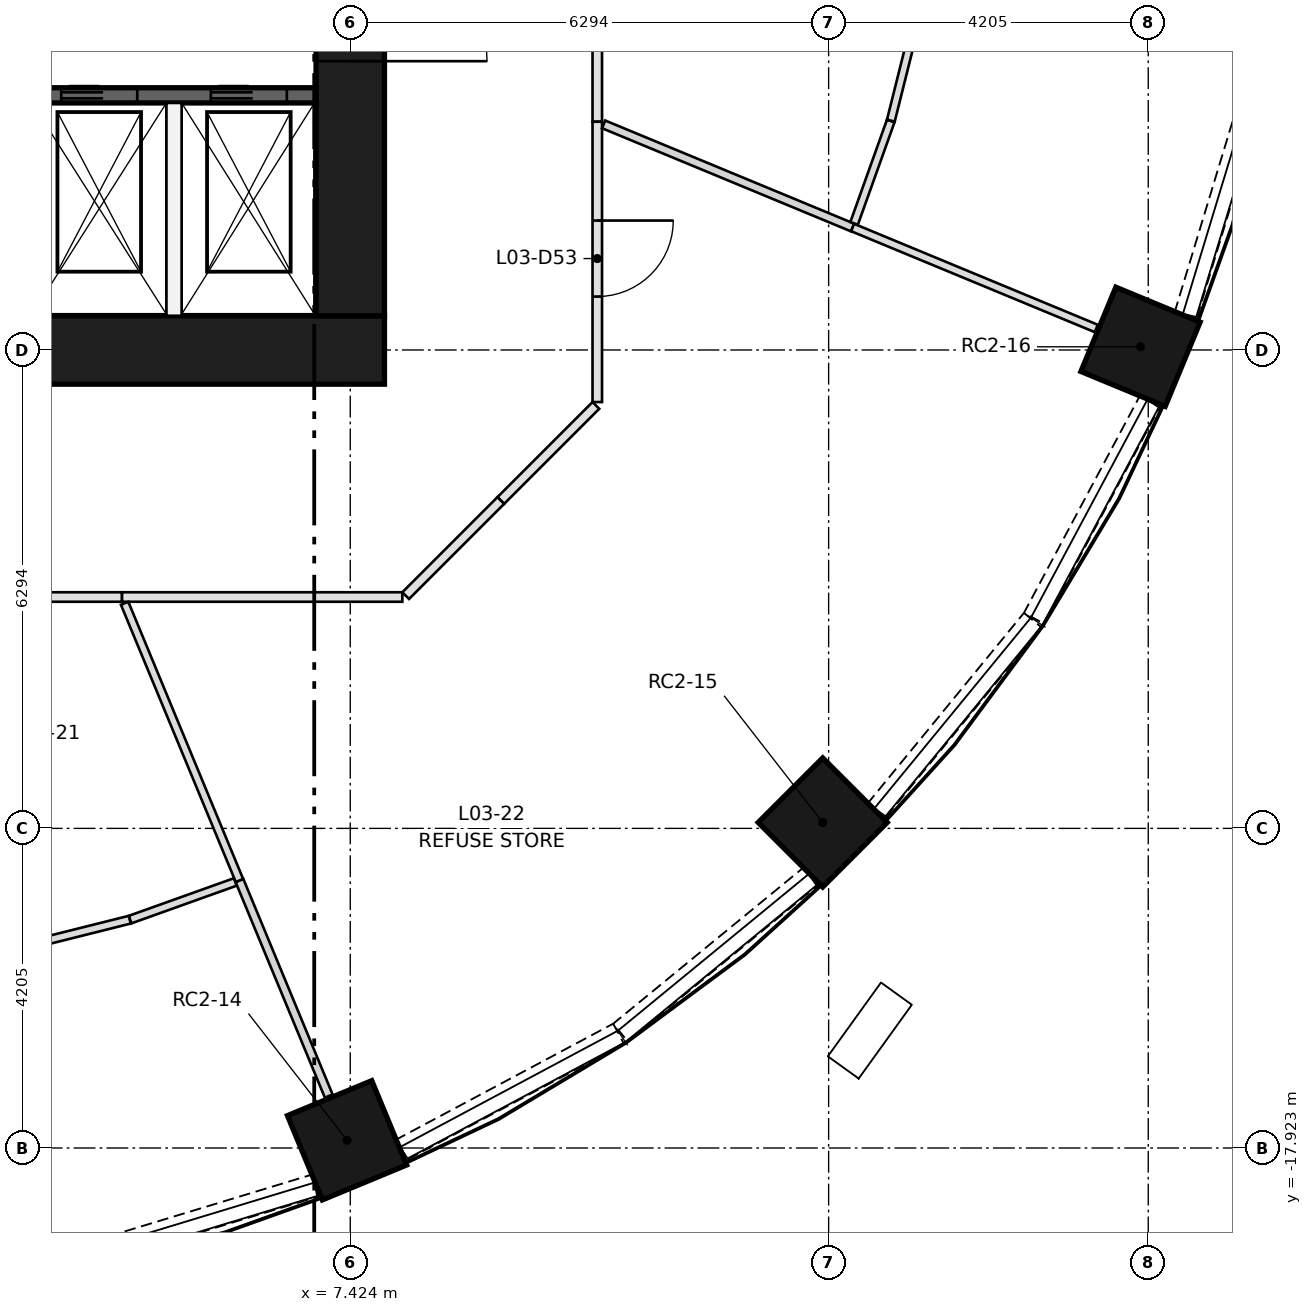
"""IFC4 building model, lengths in metres.
Left out: names, types, materials, properties, quantities, classifications, styles, units other than length and angle.
Written with IfcOpenShell. Run it as: python <this file> out.ifc"""

import sys

from ifc_helpers import new_model, si_unit, direction, frame, frame_2d, origin, origin_2d, place, context, subcontext, project, spatial, rectangle, extrude, element, fill, save


model = new_model("IFC4")
c1 = context("Model", 3, precision=1e-05, world=origin(), true_north=direction((0.0, 1.0)))
c2 = subcontext(c1, "Body", "Model", "MODEL_VIEW")
j1 = project(units=[si_unit("LENGTHUNIT", "METRE"), si_unit("PLANEANGLEUNIT", "RADIAN")], contexts=[c1])
p1 = place(None, origin())
s1 = spatial("IfcSite", under=j1, at=p1, CompositionType="ELEMENT")
p2 = place(p1, origin())
s2 = spatial("IfcBuilding", under=s1, at=p2, CompositionType="ELEMENT")
p3 = place(p2, frame((0.0, 0.0, 14.4)))
s3 = spatial("IfcBuildingStorey", under=s2, at=p3, CompositionType="ELEMENT", Elevation=14.4)
for number, where, z_axis, x_axis in (
    (1, (7.382, -17.822, 0.0), (0.0, 0.0, 1.0), (0.383, -0.924, 0.0)),
    (2, (13.64, -13.64, 0.0), (0.0, 0.0, 1.0), (0.707, -0.707, 0.0)),
    (3, (17.822, -7.382, 0.0), (0.0, 0.0, 1.0), (0.924, -0.383, 0.0)),
):
    element("IfcColumn", number, at=place(p3, frame(where, z_axis=z_axis, x_axis=x_axis)), inside=s3, PredefinedType="COLUMN", context=c2, shape_type="SweptSolid", body=[
        extrude(rectangle(XDim=1.2, YDim=1.2, at=origin_2d()), origin(), (0.0, 0.0, 1.0), 4.1),
    ])
p4 = place(p3, frame((-7.874, -7.424, 0.0), z_axis=(0.0, 0.0, 1.0), x_axis=(1.0, 0.0, 0.0)))
e4 = element("IfcWall", 4, at=p4, inside=s3, PredefinedType="SHEAR", context=c2, shape_type="SweptSolid", body=[
    extrude(rectangle(XDim=15.748, YDim=0.9, at=frame_2d((7.874, 0.0))), origin(), (0.0, 0.0, 1.0), 4.1),
])
p5 = place(p3, frame((7.424, -6.974, 0.0), z_axis=(0.0, 0.0, 1.0), x_axis=(0.0, 1.0, 0.0)))
e5 = element("IfcWall", 5, at=p5, inside=s3, PredefinedType="SHEAR", context=c2, shape_type="SweptSolid", body=[
    extrude(rectangle(XDim=13.948, YDim=0.9, at=frame_2d((6.974, 0.0))), origin(), (0.0, 0.0, 1.0), 4.1),
])
p6 = place(p5, frame((6.474, 0.0, 0.0)))
e6 = element("IfcOpeningElement", 6, at=p6, cuts=e5, PredefinedType="OPENING", context=c2, shape_type="SweptSolid", body=[
    extrude(rectangle(XDim=1.0, YDim=2.1, at=frame_2d((0.5, 1.05))), frame((0.0, 0.46, 0.0), z_axis=(0.0, -1.0, 0.0), x_axis=(1.0, 0.0, 0.0)), (0.0, 0.0, 1.0), 0.92),
])
p7 = place(p5, frame((3.35, 0.0, 0.0)))
e7 = element("IfcOpeningElement", 7, at=p7, cuts=e5, PredefinedType="OPENING", context=c2, shape_type="SweptSolid", body=[
    extrude(rectangle(XDim=1.8, YDim=2.1, at=frame_2d((0.9, 1.05))), frame((0.0, 0.46, 0.0), z_axis=(0.0, -1.0, 0.0), x_axis=(1.0, 0.0, 0.0)), (0.0, 0.0, 1.0), 0.92),
])
p8 = place(p5, frame((8.799, 0.0, 0.0)))
e8 = element("IfcOpeningElement", 8, at=p8, cuts=e5, PredefinedType="OPENING", context=c2, shape_type="SweptSolid", body=[
    extrude(rectangle(XDim=1.8, YDim=2.1, at=frame_2d((0.9, 1.05))), frame((0.0, 0.46, 0.0), z_axis=(0.0, -1.0, 0.0), x_axis=(1.0, 0.0, 0.0)), (0.0, 0.0, 1.0), 0.92),
])
p9 = place(p3, frame((-6.974, -4.074, 0.0), z_axis=(0.0, 0.0, 1.0), x_axis=(1.0, 0.0, 0.0)))
e9 = element("IfcWall", 9, at=p9, inside=s3, PredefinedType="SHEAR", context=c2, shape_type="SweptSolid", body=[
    extrude(rectangle(XDim=13.948, YDim=0.2, at=frame_2d((6.974, 0.0))), origin(), (0.0, 0.0, 1.0), 3.7),
])
p10 = place(p9, frame((0.918, 0.0, 0.0)))
e10 = element("IfcOpeningElement", 10, at=p10, cuts=e9, PredefinedType="OPENING", context=c2, shape_type="SweptSolid", body=[
    extrude(rectangle(XDim=1.1, YDim=2.1, at=frame_2d((0.55, 1.05))), frame((0.0, 0.11, 0.0), z_axis=(0.0, -1.0, 0.0), x_axis=(1.0, 0.0, 0.0)), (0.0, 0.0, 1.0), 0.22),
])
p11 = place(p9, frame((4.055, 0.0, 0.0)))
e11 = element("IfcOpeningElement", 11, at=p11, cuts=e9, PredefinedType="OPENING", context=c2, shape_type="SweptSolid", body=[
    extrude(rectangle(XDim=1.1, YDim=2.1, at=frame_2d((0.55, 1.05))), frame((0.0, 0.11, 0.0), z_axis=(0.0, -1.0, 0.0), x_axis=(1.0, 0.0, 0.0)), (0.0, 0.0, 1.0), 0.22),
])
p12 = place(p9, frame((6.658, 0.0, 0.0)))
e12 = element("IfcOpeningElement", 12, at=p12, cuts=e9, PredefinedType="OPENING", context=c2, shape_type="SweptSolid", body=[
    extrude(rectangle(XDim=1.0, YDim=2.1, at=frame_2d((0.5, 1.05))), frame((0.0, 0.11, 0.0), z_axis=(0.0, -1.0, 0.0), x_axis=(1.0, 0.0, 0.0)), (0.0, 0.0, 1.0), 0.22),
])
p13 = place(p9, frame((8.627, 0.0, 0.0)))
e13 = element("IfcOpeningElement", 13, at=p13, cuts=e9, PredefinedType="OPENING", context=c2, shape_type="SweptSolid", body=[
    extrude(rectangle(XDim=1.0, YDim=2.1, at=frame_2d((0.5, 1.05))), frame((0.0, 0.11, 0.0), z_axis=(0.0, -1.0, 0.0), x_axis=(1.0, 0.0, 0.0)), (0.0, 0.0, 1.0), 0.22),
])
p14 = place(p9, frame((10.595, 0.0, 0.0)))
e14 = element("IfcOpeningElement", 14, at=p14, cuts=e9, PredefinedType="OPENING", context=c2, shape_type="SweptSolid", body=[
    extrude(rectangle(XDim=1.0, YDim=2.1, at=frame_2d((0.5, 1.05))), frame((0.0, 0.11, 0.0), z_axis=(0.0, -1.0, 0.0), x_axis=(1.0, 0.0, 0.0)), (0.0, 0.0, 1.0), 0.22),
])
p15 = place(p9, frame((12.564, 0.0, 0.0)))
e15 = element("IfcOpeningElement", 15, at=p15, cuts=e9, PredefinedType="OPENING", context=c2, shape_type="SweptSolid", body=[
    extrude(rectangle(XDim=1.0, YDim=2.1, at=frame_2d((0.5, 1.05))), frame((0.0, 0.11, 0.0), z_axis=(0.0, -1.0, 0.0), x_axis=(1.0, 0.0, 0.0)), (0.0, 0.0, 1.0), 0.22),
])
p16 = place(p3, frame((5.105, -6.974, 0.0), z_axis=(0.0, 0.0, 1.0), x_axis=(0.0, 1.0, 0.0)))
e16 = element("IfcWall", 16, at=p16, inside=s3, PredefinedType="PARTITIONING", context=c2, shape_type="SweptSolid", body=[
    extrude(rectangle(XDim=2.8, YDim=0.2, at=frame_2d((1.4, 0.0))), origin(), (0.0, 0.0, 1.0), 3.7),
])
p17 = place(p3, frame((3.865, -19.357, 0.0), z_axis=(0.0, 0.0, 1.0), x_axis=(0.956908269039, 0.290390365963, 0.0)))
e17 = element("IfcWall", 17, at=p17, inside=s3, PredefinedType="SOLIDWALL", context=c2, shape_type="SweptSolid", body=[
    extrude(rectangle(XDim=3.238, YDim=0.3, at=frame_2d((1.619, 0.0))), origin(), (0.0, 0.0, 1.0), 0.45),
])
for number, where, z_axis, x_axis in (
    (18, (8.097, -17.946, 0.0), (0.0, 0.0, 1.0), (0.882, 0.471, 0.0)),
    (19, (10.979, -16.404, 0.0), (0.0, 0.0, 1.0), (0.773, 0.634, 0.0)),
    (20, (14.35, -13.482, 0.0), (0.0, 0.0, 1.0), (0.634, 0.773, 0.0)),
    (21, (16.42, -10.954, 0.0), (0.0, 0.0, 1.0), (0.471, 0.882, 0.0)),
):
    element("IfcWall", number, at=place(p3, frame(where, z_axis=z_axis, x_axis=x_axis)), inside=s3, PredefinedType="SOLIDWALL", context=c2, shape_type="SweptSolid", body=[
        extrude(rectangle(XDim=3.239, YDim=0.3, at=frame_2d((1.619, 0.0))), origin(), (0.0, 0.0, 1.0), 0.45),
    ])
p18 = place(p3, frame((18.417, -6.964, 0.0), z_axis=(0.0, 0.0, 1.0), x_axis=(0.290390365963, 0.956908269039, 0.0)))
e22 = element("IfcWall", 22, at=p18, inside=s3, PredefinedType="SOLIDWALL", context=c2, shape_type="SweptSolid", body=[
    extrude(rectangle(XDim=3.238, YDim=0.3, at=frame_2d((1.619, 0.0))), origin(), (0.0, 0.0, 1.0), 0.45),
])
p19 = place(p3, frame((10.674, 4.421, 0.0), z_axis=(0.0, 0.0, 1.0), x_axis=(0.0, -1.0, 0.0)))
e23 = element("IfcWall", 23, at=p19, inside=s3, PredefinedType="PARTITIONING", context=c2, shape_type="SweptSolid", body=[
    extrude(rectangle(XDim=8.843, YDim=0.125, at=frame_2d((4.421, 0.0))), origin(), (0.0, 0.0, 1.0), 3.7),
])
p20 = place(p19, frame((3.9, 0.0, 0.0)))
e24 = element("IfcOpeningElement", 24, at=p20, cuts=e23, PredefinedType="OPENING", context=c2, shape_type="SweptSolid", body=[
    extrude(rectangle(XDim=1.0, YDim=2.1, at=frame_2d((0.5, 1.05))), frame((0.0, 0.073, 0.0), z_axis=(0.0, -1.0, 0.0), x_axis=(1.0, 0.0, 0.0)), (0.0, 0.0, 1.0), 0.145),
])
p21 = place(p3, frame((10.656, -8.153, 0.0), z_axis=(0.0, 0.0, 1.0), x_axis=(-0.707106781187, -0.707106781187, 0.0)))
e25 = element("IfcWall", 25, at=p21, inside=s3, PredefinedType="PARTITIONING", context=c2, shape_type="SweptSolid", body=[
    extrude(rectangle(XDim=1.77, YDim=0.125, at=frame_2d((0.885, 0.0))), origin(), (0.0, 0.0, 1.0), 3.7),
])
p22 = place(p3, frame((10.674, -4.421, 0.0), z_axis=(0.0, 0.0, 1.0), x_axis=(0.0, -1.0, 0.0)))
e26 = element("IfcWall", 26, at=p22, inside=s3, PredefinedType="PARTITIONING", context=c2, shape_type="SweptSolid", body=[
    extrude(rectangle(XDim=3.688, YDim=0.125, at=frame_2d((1.844, 0.0))), origin(), (0.0, 0.0, 1.0), 3.7),
])
p23 = place(p22, frame((1.3, 0.0, 0.0)))
e27 = element("IfcOpeningElement", 27, at=p23, cuts=e26, PredefinedType="OPENING", context=c2, shape_type="SweptSolid", body=[
    extrude(rectangle(XDim=1.0, YDim=2.1, at=frame_2d((0.5, 1.05))), frame((0.0, 0.073, 0.0), z_axis=(0.0, -1.0, 0.0), x_axis=(1.0, 0.0, 0.0)), (0.0, 0.0, 1.0), 0.145),
])
p24 = place(p3, frame((4.421, -10.674, 0.0), z_axis=(0.0, 0.0, 1.0), x_axis=(-1.0, 0.0, 0.0)))
e28 = element("IfcWall", 28, at=p24, inside=s3, PredefinedType="PARTITIONING", context=c2, shape_type="SweptSolid", body=[
    extrude(rectangle(XDim=4.421, YDim=0.125, at=frame_2d((2.211, 0.0))), origin(), (0.0, 0.0, 1.0), 3.7),
])
p25 = place(p24, frame((1.7, 0.0, 0.0)))
e29 = element("IfcOpeningElement", 29, at=p25, cuts=e28, PredefinedType="OPENING", context=c2, shape_type="SweptSolid", body=[
    extrude(rectangle(XDim=1.0, YDim=2.1, at=frame_2d((0.5, 1.05))), frame((0.0, 0.073, 0.0), z_axis=(0.0, -1.0, 0.0), x_axis=(1.0, 0.0, 0.0)), (0.0, 0.0, 1.0), 0.145),
])
p26 = place(p3, frame((8.109, -10.674, 0.0), z_axis=(0.0, 0.0, 1.0), x_axis=(-1.0, 0.0, 0.0)))
e30 = element("IfcWall", 30, at=p26, inside=s3, PredefinedType="PARTITIONING", context=c2, shape_type="SweptSolid", body=[
    extrude(rectangle(XDim=3.688, YDim=0.125, at=frame_2d((1.844, 0.0))), origin(), (0.0, 0.0, 1.0), 3.7),
])
p27 = place(p3, frame((9.405, -9.405, 0.0), z_axis=(0.0, 0.0, 1.0), x_axis=(-0.707106781187, -0.707106781187, 0.0)))
e31 = element("IfcWall", 31, at=p27, inside=s3, PredefinedType="PARTITIONING", context=c2, shape_type="SweptSolid", body=[
    extrude(rectangle(XDim=1.77, YDim=0.125, at=frame_2d((0.885, 0.0))), origin(), (0.0, 0.0, 1.0), 3.7),
])
p28 = place(p3, frame((14.034, -5.813, 0.0), z_axis=(0.0, 0.0, 1.0), x_axis=(-0.923863266707, 0.38272269913, 0.0)))
e32 = element("IfcWall", 32, at=p28, inside=s3, PredefinedType="PARTITIONING", context=c2, shape_type="SweptSolid", body=[
    extrude(rectangle(XDim=3.546, YDim=0.11, at=frame_2d((1.773, 0.0))), origin(), (0.0, 0.0, 1.0), 3.7),
])
p29 = place(p3, frame((14.535, -4.412, 0.0), z_axis=(0.0, 0.0, 1.0), x_axis=(-0.336941851805, -0.941525458234, 0.0)))
e33 = element("IfcWall", 33, at=p29, inside=s3, PredefinedType="PARTITIONING", context=c2, shape_type="SweptSolid", body=[
    extrude(rectangle(XDim=1.43, YDim=0.105, at=frame_2d((0.715, 0.0))), origin(), (0.0, 0.0, 1.0), 3.7),
])
p30 = place(p3, frame((14.897, -2.966, 0.0), z_axis=(0.0, 0.0, 1.0), x_axis=(-0.242883607916, -0.97005543811, 0.0)))
e34 = element("IfcWall", 34, at=p30, inside=s3, PredefinedType="PARTITIONING", context=c2, shape_type="SweptSolid", body=[
    extrude(rectangle(XDim=1.486, YDim=0.105, at=frame_2d((0.743, 0.0))), origin(), (0.0, 0.0, 1.0), 3.7),
])
p31 = place(p3, frame((3.044, -15.29, 0.0), z_axis=(0.0, 0.0, 1.0), x_axis=(0.97001049275, 0.243063045228, 0.0)))
e35 = element("IfcWall", 35, at=p31, inside=s3, PredefinedType="PARTITIONING", context=c2, shape_type="SweptSolid", body=[
    extrude(rectangle(XDim=1.525, YDim=0.105, at=frame_2d((0.762, 0.0))), origin(), (0.0, 0.0, 1.0), 3.7),
])
p32 = place(p3, frame((4.528, -14.918, 0.0), z_axis=(0.0, 0.0, 1.0), x_axis=(0.941546321854, 0.336883546352, 0.0)))
e36 = element("IfcWall", 36, at=p32, inside=s3, PredefinedType="PARTITIONING", context=c2, shape_type="SweptSolid", body=[
    extrude(rectangle(XDim=1.47, YDim=0.105, at=frame_2d((0.735, 0.0))), origin(), (0.0, 0.0, 1.0), 3.7),
])
p33 = place(p3, frame((5.966, -14.403, 0.0), z_axis=(0.0, 0.0, 1.0), x_axis=(0.382688933871, -0.923877253694, 0.0)))
e37 = element("IfcWall", 37, at=p33, inside=s3, PredefinedType="PARTITIONING", context=c2, shape_type="SweptSolid", body=[
    extrude(rectangle(XDim=3.07, YDim=0.11, at=frame_2d((1.535, 0.0))), origin(), (0.0, 0.0, 1.0), 3.7),
])
p34 = place(p3, frame((4.456, -10.757, 0.0), z_axis=(0.0, 0.0, 1.0), x_axis=(0.382677731611, -0.923881893821, 0.0)))
e38 = element("IfcWall", 38, at=p34, inside=s3, PredefinedType="PARTITIONING", context=c2, shape_type="SweptSolid", body=[
    extrude(rectangle(XDim=3.947, YDim=0.105, at=frame_2d((1.974, 0.0))), origin(), (0.0, 0.0, 1.0), 3.7),
])
p35 = place(p3, frame((14.034, -5.813, 0.0), z_axis=(0.0, 0.0, 1.0), x_axis=(0.923880484932, -0.382681133009, 0.0)))
e39 = element("IfcWall", 39, at=p35, inside=s3, PredefinedType="PARTITIONING", context=c2, shape_type="SweptSolid", body=[
    extrude(rectangle(XDim=3.47, YDim=0.105, at=frame_2d((1.735, 0.0))), origin(), (0.0, 0.0, 1.0), 3.7),
])
p36 = place(p14, origin())
e40 = element("IfcDoor", 40, at=p36, inside=s3, OperationType="DOUBLE_DOOR_SLIDING", PredefinedType="DOOR", context=c2, shape_type="SweptSolid", body=[
    extrude(rectangle(XDim=1.0, YDim=2.1, at=frame_2d((0.5, 1.05))), frame((0.0, 0.025, 0.0), z_axis=(0.0, -1.0, 0.0), x_axis=(1.0, 0.0, 0.0)), (0.0, 0.0, 1.0), 0.05),
])
fill(e14, e40)
p37 = place(p15, origin())
e41 = element("IfcDoor", 41, at=p37, inside=s3, OperationType="DOUBLE_DOOR_SLIDING", PredefinedType="DOOR", context=c2, shape_type="SweptSolid", body=[
    extrude(rectangle(XDim=1.0, YDim=2.1, at=frame_2d((0.5, 1.05))), frame((0.0, 0.025, 0.0), z_axis=(0.0, -1.0, 0.0), x_axis=(1.0, 0.0, 0.0)), (0.0, 0.0, 1.0), 0.05),
])
fill(e15, e41)
p38 = place(p7, frame((1.8, 0.0, 0.0), z_axis=(0.0, 0.0, 1.0), x_axis=(-1.0, 0.0, 0.0)))
e42 = element("IfcDoor", 42, at=p38, inside=s3, OperationType="DOUBLE_DOOR_SINGLE_SWING", PredefinedType="DOOR", context=c2, shape_type="SweptSolid", body=[
    extrude(rectangle(XDim=1.8, YDim=2.1, at=frame_2d((0.9, 1.05))), frame((0.0, 0.025, 0.0), z_axis=(0.0, -1.0, 0.0), x_axis=(1.0, 0.0, 0.0)), (0.0, 0.0, 1.0), 0.05),
])
fill(e7, e42)
p39 = place(p23, origin())
e43 = element("IfcDoor", 43, at=p39, inside=s3, OperationType="SINGLE_SWING_LEFT", PredefinedType="DOOR", context=c2, shape_type="SweptSolid", body=[
    extrude(rectangle(XDim=1.0, YDim=2.1, at=frame_2d((0.5, 1.05))), frame((0.0, 0.025, 0.0), z_axis=(0.0, -1.0, 0.0), x_axis=(1.0, 0.0, 0.0)), (0.0, 0.0, 1.0), 0.05),
])
fill(e27, e43)
save(model, sys.argv[1])
